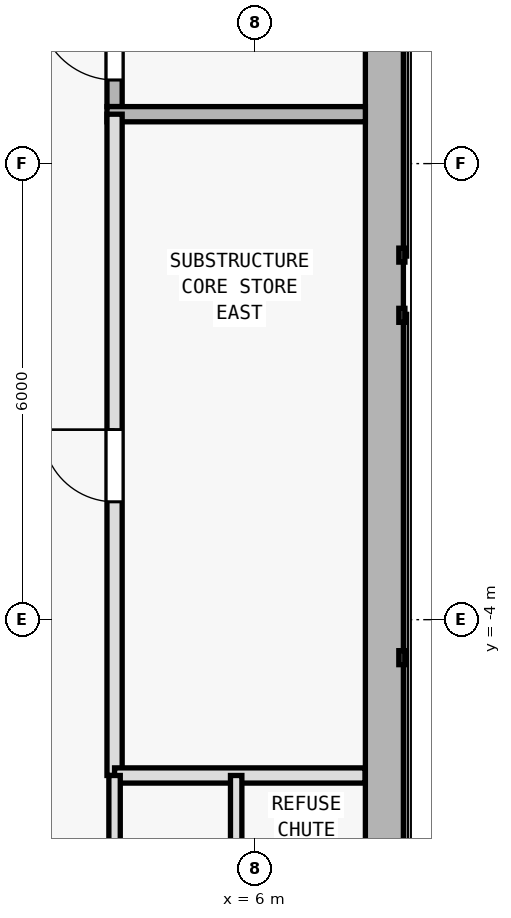
"""IFC4 building model, lengths in metres.
Left out: names, types, materials, properties, quantities, classifications, styles, units other than length and angle.
Written with IfcOpenShell. Run it as: python <this file> out.ifc"""

import sys

from ifc_helpers import new_model, si_unit, direction, frame, frame_2d, origin, origin_2d, place, context, subcontext, project, spatial, rectangle, i_section, extrude, element, fill, save


model = new_model("IFC4")
c1 = context("Model", 3, precision=1e-05, world=origin(), true_north=direction((0.0, 1.0)))
c2 = subcontext(c1, "Body", "Model", "MODEL_VIEW")
j1 = project(units=[si_unit("LENGTHUNIT", "METRE"), si_unit("PLANEANGLEUNIT", "RADIAN")], contexts=[c1])
p1 = place(None, origin())
s1 = spatial("IfcSite", under=j1, at=p1, CompositionType="ELEMENT")
p2 = place(p1, origin())
s2 = spatial("IfcBuilding", under=s1, at=p2, CompositionType="ELEMENT")
p3 = place(p2, frame((0.0, 0.0, 304.8)))
s3 = spatial("IfcBuildingStorey", under=s2, at=p3, CompositionType="ELEMENT", Elevation=304.8)
p4 = place(p3, frame((7.7, 0.4, 0.0), z_axis=(0.0, 0.0, 1.0), x_axis=(1.0, 0.0, 0.0)))
e1 = element("IfcColumn", 1, at=p4, inside=s3, PredefinedType="COLUMN", context=c2, shape_type="SweptSolid", body=[
    extrude(i_section(OverallWidth=0.374, OverallDepth=0.372, WebThickness=0.012, FlangeThickness=0.02, FilletRadius=0.015, at=origin_2d()), origin(), (0.0, 0.0, 1.0), 3.6),
])
p5 = place(p3, frame((7.7, 9.95, 0.0), z_axis=(0.0, 0.0, 1.0), x_axis=(0.0, -1.0, 0.0)))
e2 = element("IfcWall", 2, at=p5, inside=s3, PredefinedType="SHEAR", context=c2, shape_type="SweptSolid", body=[
    extrude(rectangle(XDim=19.1, YDim=0.5, at=frame_2d((9.55, 0.0))), origin(), (0.0, 0.0, 1.0), 3.34),
])
p6 = place(p3, frame((4.15, 2.75, 0.0), z_axis=(0.0, 0.0, 1.0), x_axis=(0.0, 1.0, 0.0)))
e3 = element("IfcWall", 3, at=p6, inside=s3, PredefinedType="SOLIDWALL", context=c2, shape_type="SweptSolid", body=[
    extrude(rectangle(XDim=7.2, YDim=0.2, at=frame_2d((3.6, 0.0))), origin(), (0.0, 0.0, 1.0), 3.34),
])
p7 = place(p6, frame((0.35, 0.0, 0.0)))
e4 = element("IfcOpeningElement", 4, at=p7, cuts=e3, PredefinedType="OPENING", context=c2, shape_type="SweptSolid", body=[
    extrude(rectangle(XDim=1.0, YDim=2.15, at=frame_2d((0.5, 1.075))), frame((0.0, 0.11, 0.0), z_axis=(0.0, -1.0, 0.0), x_axis=(1.0, 0.0, 0.0)), (0.0, 0.0, 1.0), 0.22),
])
p8 = place(p3, frame((4.05, 2.65, 0.0), z_axis=(0.0, 0.0, 1.0), x_axis=(1.0, 0.0, 0.0)))
e5 = element("IfcWall", 5, at=p8, inside=s3, PredefinedType="SOLIDWALL", context=c2, shape_type="SweptSolid", body=[
    extrude(rectangle(XDim=3.4, YDim=0.2, at=frame_2d((1.7, 0.0))), origin(), (0.0, 0.0, 1.0), 3.34),
])
p9 = place(p3, frame((4.15, -6.05, 0.0), z_axis=(0.0, 0.0, 1.0), x_axis=(0.0, 1.0, 0.0)))
e6 = element("IfcWall", 6, at=p9, inside=s3, PredefinedType="SOLIDWALL", context=c2, shape_type="SweptSolid", body=[
    extrude(rectangle(XDim=8.7, YDim=0.2, at=frame_2d((4.35, 0.0))), origin(), (0.0, 0.0, 1.0), 3.34),
])
p10 = place(p9, frame((3.6, 0.0, 0.0)))
e7 = element("IfcOpeningElement", 7, at=p10, cuts=e6, PredefinedType="OPENING", context=c2, shape_type="SweptSolid", body=[
    extrude(rectangle(XDim=0.95, YDim=2.1, at=frame_2d((0.475, 1.05))), frame((0.0, 0.11, 0.0), z_axis=(0.0, -1.0, 0.0), x_axis=(1.0, 0.0, 0.0)), (0.0, 0.0, 1.0), 0.22),
])
p11 = place(p3, frame((4.15, -6.05, 0.0), z_axis=(0.0, 0.0, 1.0), x_axis=(1.0, 0.0, 0.0)))
e8 = element("IfcWall", 8, at=p11, inside=s3, PredefinedType="SOLIDWALL", context=c2, shape_type="SweptSolid", body=[
    extrude(rectangle(XDim=3.295, YDim=0.2, at=frame_2d((1.647, 0.0))), origin(), (0.0, 0.0, 1.0), 3.34),
])
p12 = place(p3, frame((4.15, -9.145, 0.0), z_axis=(0.0, 0.0, 1.0), x_axis=(0.0, 1.0, 0.0)))
e9 = element("IfcWall", 9, at=p12, inside=s3, PredefinedType="PARTITIONING", context=c2, shape_type="SweptSolid", body=[
    extrude(rectangle(XDim=3.095, YDim=0.15, at=frame_2d((1.547, 0.0))), origin(), (0.0, 0.0, 1.0), 3.34),
])
p13 = place(p12, frame((0.845, 0.0, 0.0)))
e10 = element("IfcOpeningElement", 10, at=p13, cuts=e9, PredefinedType="OPENING", context=c2, shape_type="SweptSolid", body=[
    extrude(rectangle(XDim=0.9, YDim=2.1, at=frame_2d((0.45, 1.05))), frame((0.0, 0.085, 0.0), z_axis=(0.0, -1.0, 0.0), x_axis=(1.0, 0.0, 0.0)), (0.0, 0.0, 1.0), 0.17),
])
p14 = place(p3, frame((5.75, -9.145, 0.0), z_axis=(0.0, 0.0, 1.0), x_axis=(0.0, 1.0, 0.0)))
e11 = element("IfcWall", 11, at=p14, inside=s3, PredefinedType="PARTITIONING", context=c2, shape_type="SweptSolid", body=[
    extrude(rectangle(XDim=3.095, YDim=0.15, at=frame_2d((1.547, 0.0))), origin(), (0.0, 0.0, 1.0), 3.34),
])
p15 = place(p14, frame((0.845, 0.0, 0.0)))
e12 = element("IfcOpeningElement", 12, at=p15, cuts=e11, PredefinedType="OPENING", context=c2, shape_type="SweptSolid", body=[
    extrude(rectangle(XDim=0.9, YDim=2.1, at=frame_2d((0.45, 1.05))), frame((0.0, 0.085, 0.0), z_axis=(0.0, -1.0, 0.0), x_axis=(1.0, 0.0, 0.0)), (0.0, 0.0, 1.0), 0.17),
])
p16 = place(p7, origin())
e13 = element("IfcDoor", 13, at=p16, inside=s3, OperationType="SINGLE_SWING_RIGHT", PredefinedType="DOOR", context=c2, shape_type="SweptSolid", body=[
    extrude(rectangle(XDim=1.0, YDim=2.15, at=frame_2d((0.5, 1.075))), frame((0.0, 0.025, 0.0), z_axis=(0.0, -1.0, 0.0), x_axis=(1.0, 0.0, 0.0)), (0.0, 0.0, 1.0), 0.05),
])
fill(e4, e13)
p17 = place(p10, origin())
e14 = element("IfcDoor", 14, at=p17, inside=s3, OperationType="SINGLE_SWING_RIGHT", PredefinedType="DOOR", context=c2, shape_type="SweptSolid", body=[
    extrude(rectangle(XDim=0.95, YDim=2.1, at=frame_2d((0.475, 1.05))), frame((0.0, 0.025, 0.0), z_axis=(0.0, -1.0, 0.0), x_axis=(1.0, 0.0, 0.0)), (0.0, 0.0, 1.0), 0.05),
])
fill(e7, e14)
save(model, sys.argv[1])
